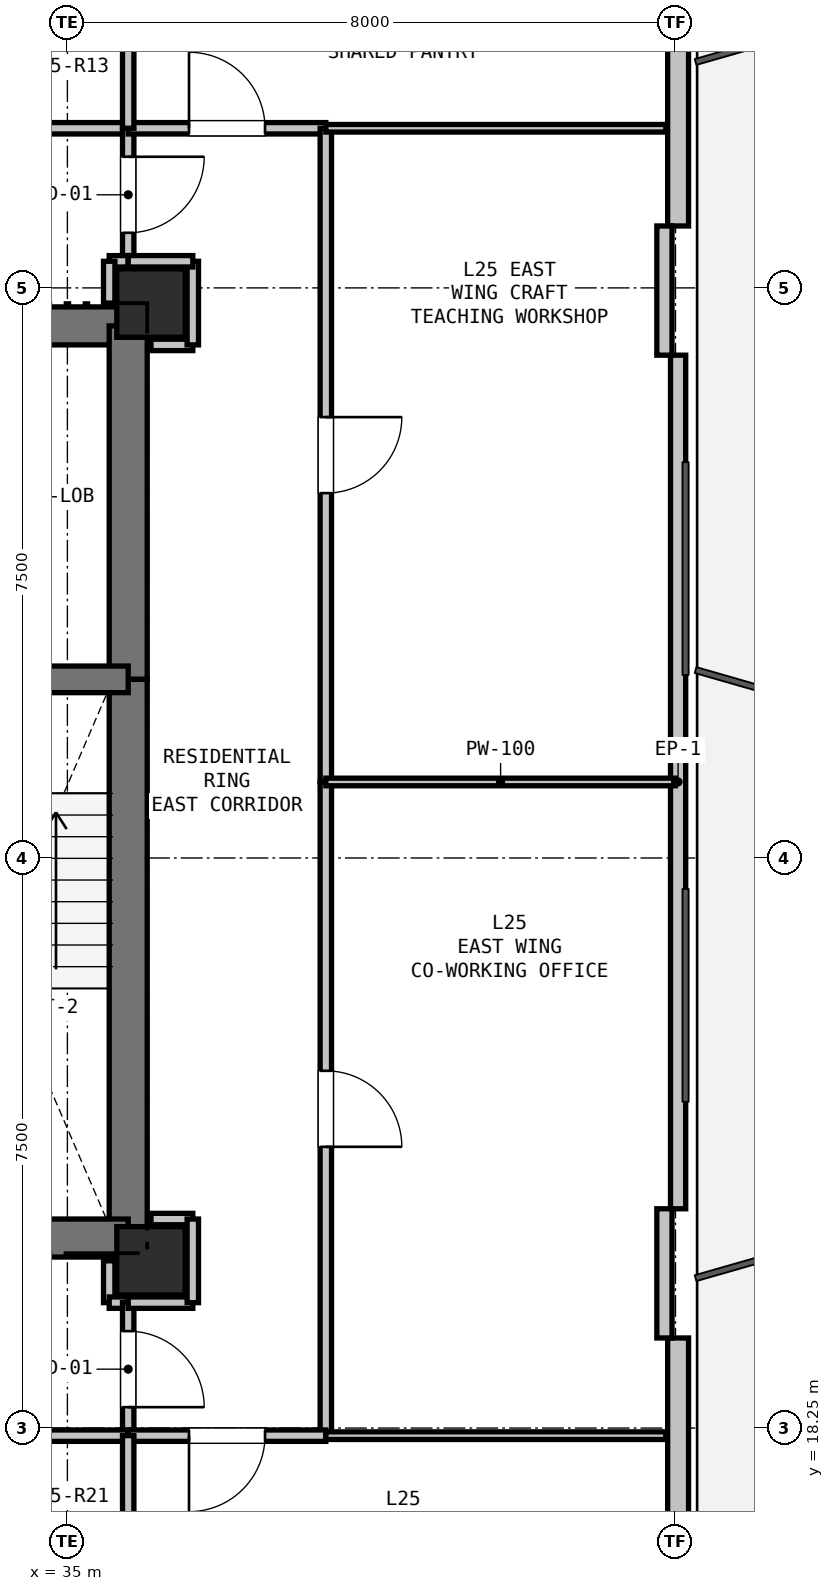
"""IFC4 building model, lengths in metres.
Left out: names, types, materials, properties, quantities, classifications, styles, units other than length and angle.
Written with IfcOpenShell. Run it as: python <this file> out.ifc"""

import sys

from ifc_helpers import new_model, si_unit, direction, frame, frame_2d, origin, origin_2d, place, context, subcontext, project, spatial, rectangle, extrude, element, fill, save


model = new_model("IFC4")
c1 = context("Model", 3, precision=1e-05, world=origin(), true_north=direction((0.0, 1.0)))
c2 = subcontext(c1, "Body", "Model", "MODEL_VIEW")
j1 = project(units=[si_unit("LENGTHUNIT", "METRE"), si_unit("PLANEANGLEUNIT", "RADIAN")], contexts=[c1])
p1 = place(None, origin())
s1 = spatial("IfcSite", under=j1, at=p1, CompositionType="ELEMENT")
p2 = place(p1, origin())
s2 = spatial("IfcBuilding", under=s1, at=p2, CompositionType="ELEMENT")
p3 = place(p2, frame((0.0, 0.0, 93.3)))
s3 = spatial("IfcBuildingStorey", under=s2, at=p3, CompositionType="ELEMENT", Elevation=93.3)
for number, where, z_axis, x_axis in (
    (1, (36.1, 33.05, 0.0), (0.0, 0.0, 1.0), (1.0, 0.0, 0.0)),
    (2, (36.1, 20.45, 0.0), (0.0, 0.0, 1.0), (1.0, 0.0, 0.0)),
):
    element("IfcColumn", number, at=place(p3, frame(where, z_axis=z_axis, x_axis=x_axis)), inside=s3, PredefinedType="COLUMN", context=c2, shape_type="SweptSolid", body=[
        extrude(rectangle(XDim=0.9, YDim=0.9, at=origin_2d()), origin(), (0.0, 0.0, 1.0), 3.3),
    ])
p4 = place(p3, frame((43.035, 45.994, 0.0), z_axis=(0.0, 0.0, 1.0), x_axis=(0.0, -1.0, 0.0)))
e3 = element("IfcWall", 3, at=p4, inside=s3, PredefinedType="SOLIDWALL", context=c2, shape_type="SweptSolid", body=[
    extrude(rectangle(XDim=11.93, YDim=0.275, at=frame_2d((5.965, 0.0))), origin(), (0.0, 0.0, 1.0), 2.67),
])
p5 = place(p4, frame((2.176, 0.0, 0.0)))
e4 = element("IfcOpeningElement", 4, at=p5, cuts=e3, PredefinedType="OPENING", context=c2, shape_type="SweptSolid", body=[
    extrude(rectangle(XDim=1.0, YDim=2.1, at=frame_2d((0.5, 1.05))), frame((0.0, 0.147, 0.0), z_axis=(0.0, -1.0, 0.0), x_axis=(1.0, 0.0, 0.0)), (0.0, 0.0, 1.0), 0.295),
])
p6 = place(p3, frame((43.035, 32.365, 0.0), z_axis=(0.0, 0.0, 1.0), x_axis=(0.0, -1.0, 0.0)))
e5 = element("IfcWall", 5, at=p6, inside=s3, PredefinedType="PARAPET", context=c2, shape_type="SweptSolid", body=[
    extrude(rectangle(XDim=11.229, YDim=0.2, at=frame_2d((5.615, 0.0))), origin(), (0.0, 0.0, 1.0), 0.2),
])
p7 = place(p3, frame((43.035, 19.435, 0.0), z_axis=(0.0, 0.0, 1.0), x_axis=(0.0, -1.0, 0.0)))
e6 = element("IfcWall", 6, at=p7, inside=s3, PredefinedType="SOLIDWALL", context=c2, shape_type="SweptSolid", body=[
    extrude(rectangle(XDim=11.93, YDim=0.275, at=frame_2d((5.965, 0.0))), origin(), (0.0, 0.0, 1.0), 2.67),
])
p8 = place(p7, frame((7.119, 0.0, 0.9)))
e7 = element("IfcOpeningElement", 7, at=p8, cuts=e6, PredefinedType="OPENING", context=c2, shape_type="SweptSolid", body=[
    extrude(rectangle(XDim=1.2, YDim=1.4, at=frame_2d((0.6, 0.7))), frame((0.0, 0.147, 0.0), z_axis=(0.0, -1.0, 0.0), x_axis=(1.0, 0.0, 0.0)), (0.0, 0.0, 1.0), 0.295),
])
for number, where, z_axis, x_axis in (
    (8, (42.854, 34.065, 0.0), (0.0, 0.0, 1.0), (0.0, -1.0, 0.0)),
    (9, (42.854, 21.135, 0.0), (0.0, 0.0, 1.0), (0.0, -1.0, 0.0)),
):
    element("IfcWall", number, at=place(p3, frame(where, z_axis=z_axis, x_axis=x_axis)), inside=s3, PredefinedType="PARAPET", context=c2, shape_type="SweptSolid", body=[
        extrude(rectangle(XDim=1.7, YDim=0.2, at=frame_2d((0.85, 0.0))), origin(), (0.0, 0.0, 1.0), 2.67),
    ])
p9 = place(p3, frame((32.35, 32.75, 0.0), z_axis=(0.0, 0.0, 1.0), x_axis=(1.0, 0.0, 0.0)))
e10 = element("IfcWall", 10, at=p9, inside=s3, PredefinedType="SHEAR", context=c2, shape_type="SweptSolid", body=[
    extrude(rectangle(XDim=3.45, YDim=0.5, at=frame_2d((1.725, 0.0))), origin(), (0.0, 0.0, 1.0), 3.05),
])
p10 = place(p9, frame((0.65, 0.0, 0.0)))
e11 = element("IfcOpeningElement", 11, at=p10, cuts=e10, PredefinedType="OPENING", context=c2, shape_type="SweptSolid", body=[
    extrude(rectangle(XDim=1.15, YDim=2.15, at=frame_2d((0.575, 1.075))), frame((0.0, 0.26, 0.0), z_axis=(0.0, -1.0, 0.0), x_axis=(1.0, 0.0, 0.0)), (0.0, 0.0, 1.0), 0.52),
])
p11 = place(p3, frame((35.8, 32.75, 0.0), z_axis=(0.0, 0.0, 1.0), x_axis=(0.0, -1.0, 0.0)))
e12 = element("IfcWall", 12, at=p11, inside=s3, PredefinedType="SHEAR", context=c2, shape_type="SweptSolid", body=[
    extrude(rectangle(XDim=4.65, YDim=0.5, at=frame_2d((2.325, 0.0))), origin(), (0.0, 0.0, 1.0), 3.05),
])
p12 = place(p3, frame((35.8, 28.1, 0.0), z_axis=(0.0, 0.0, 1.0), x_axis=(0.0, -1.0, 0.0)))
e13 = element("IfcWall", 13, at=p12, inside=s3, PredefinedType="SHEAR", context=c2, shape_type="SweptSolid", body=[
    extrude(rectangle(XDim=7.35, YDim=0.5, at=frame_2d((3.675, 0.0))), origin(), (0.0, 0.0, 1.0), 3.05),
])
p13 = place(p3, frame((35.8, 20.75, 0.0), z_axis=(0.0, 0.0, 1.0), x_axis=(-1.0, 0.0, 0.0)))
e14 = element("IfcWall", 14, at=p13, inside=s3, PredefinedType="SHEAR", context=c2, shape_type="SweptSolid", body=[
    extrude(rectangle(XDim=3.45, YDim=0.5, at=frame_2d((1.725, 0.0))), origin(), (0.0, 0.0, 1.0), 3.05),
])
p14 = place(p3, frame((32.35, 28.1, 0.0), z_axis=(0.0, 0.0, 1.0), x_axis=(1.0, 0.0, 0.0)))
e15 = element("IfcWall", 15, at=p14, inside=s3, PredefinedType="SHEAR", context=c2, shape_type="SweptSolid", body=[
    extrude(rectangle(XDim=3.45, YDim=0.35, at=frame_2d((1.725, 0.0))), origin(), (0.0, 0.0, 1.0), 3.05),
])
p15 = place(p14, frame((1.15, 0.0, 0.0)))
e16 = element("IfcOpeningElement", 16, at=p15, cuts=e15, PredefinedType="OPENING", context=c2, shape_type="SweptSolid", body=[
    extrude(rectangle(XDim=1.15, YDim=2.15, at=frame_2d((0.575, 1.075))), frame((0.0, 0.185, 0.0), z_axis=(0.0, -1.0, 0.0), x_axis=(1.0, 0.0, 0.0)), (0.0, 0.0, 1.0), 0.37),
])
p16 = place(p3, frame((35.55, 20.45, 0.0), z_axis=(0.0, 0.0, 1.0), x_axis=(0.0, -1.0, 0.0)))
e17 = element("IfcWall", 17, at=p16, inside=s3, PredefinedType="PARTITIONING", context=c2, shape_type="SweptSolid", body=[
    extrude(rectangle(XDim=0.55, YDim=0.15, at=frame_2d((0.275, 0.0))), origin(), (0.0, 0.0, 1.0), 2.498),
])
p17 = place(p3, frame((35.55, 19.9, 0.0), z_axis=(0.0, 0.0, 1.0), x_axis=(1.0, 0.0, 0.0)))
e18 = element("IfcWall", 18, at=p17, inside=s3, PredefinedType="PARTITIONING", context=c2, shape_type="SweptSolid", body=[
    extrude(rectangle(XDim=0.25, YDim=0.15, at=frame_2d((0.125, 0.0))), origin(), (0.0, 0.0, 1.0), 3.05),
])
p18 = place(p3, frame((35.8, 19.9, 0.0), z_axis=(0.0, 0.0, 1.0), x_axis=(0.0, -1.0, 0.0)))
e19 = element("IfcWall", 19, at=p18, inside=s3, PredefinedType="PARTITIONING", context=c2, shape_type="SweptSolid", body=[
    extrude(rectangle(XDim=1.75, YDim=0.15, at=frame_2d((0.875, 0.0))), origin(), (0.0, 0.0, 1.0), 3.05),
])
p19 = place(p18, frame((0.375, 0.0, 0.0)))
e20 = element("IfcOpeningElement", 20, at=p19, cuts=e19, PredefinedType="OPENING", context=c2, shape_type="SweptSolid", body=[
    extrude(rectangle(XDim=1.0, YDim=2.15, at=frame_2d((0.5, 1.075))), frame((0.0, 0.085, 0.0), z_axis=(0.0, -1.0, 0.0), x_axis=(1.0, 0.0, 0.0)), (0.0, 0.0, 1.0), 0.17),
])
for number, where, z_axis, x_axis in (
    (21, (35.8, 18.15, 0.0), (0.0, 0.0, 1.0), (-1.0, 0.0, 0.0)),
    (22, (32.2, 35.35, 0.0), (0.0, 0.0, 1.0), (1.0, 0.0, 0.0)),
):
    element("IfcWall", number, at=place(p3, frame(where, z_axis=z_axis, x_axis=x_axis)), inside=s3, PredefinedType="PARTITIONING", context=c2, shape_type="SweptSolid", body=[
        extrude(rectangle(XDim=3.6, YDim=0.15, at=frame_2d((1.8, 0.0))), origin(), (0.0, 0.0, 1.0), 3.05),
    ])
p20 = place(p3, frame((35.8, 35.35, 0.0), z_axis=(0.0, 0.0, 1.0), x_axis=(0.0, -1.0, 0.0)))
e23 = element("IfcWall", 23, at=p20, inside=s3, PredefinedType="PARTITIONING", context=c2, shape_type="SweptSolid", body=[
    extrude(rectangle(XDim=1.75, YDim=0.15, at=frame_2d((0.875, 0.0))), origin(), (0.0, 0.0, 1.0), 3.05),
])
p21 = place(p20, frame((0.375, 0.0, 0.0)))
e24 = element("IfcOpeningElement", 24, at=p21, cuts=e23, PredefinedType="OPENING", context=c2, shape_type="SweptSolid", body=[
    extrude(rectangle(XDim=1.0, YDim=2.15, at=frame_2d((0.5, 1.075))), frame((0.0, 0.085, 0.0), z_axis=(0.0, -1.0, 0.0), x_axis=(1.0, 0.0, 0.0)), (0.0, 0.0, 1.0), 0.17),
])
p22 = place(p3, frame((35.8, 33.6, 0.0), z_axis=(0.0, 0.0, 1.0), x_axis=(-1.0, 0.0, 0.0)))
e25 = element("IfcWall", 25, at=p22, inside=s3, PredefinedType="PARTITIONING", context=c2, shape_type="SweptSolid", body=[
    extrude(rectangle(XDim=0.25, YDim=0.15, at=frame_2d((0.125, 0.0))), origin(), (0.0, 0.0, 1.0), 3.05),
])
p23 = place(p3, frame((35.55, 33.6, 0.0), z_axis=(0.0, 0.0, 1.0), x_axis=(0.0, -1.0, 0.0)))
e26 = element("IfcWall", 26, at=p23, inside=s3, PredefinedType="PARTITIONING", context=c2, shape_type="SweptSolid", body=[
    extrude(rectangle(XDim=0.55, YDim=0.15, at=frame_2d((0.275, 0.0))), origin(), (0.0, 0.0, 1.0), 2.498),
])
for number, where, z_axis, x_axis in (
    (27, (36.65, 21.0, 0.0), (0.0, 0.0, 1.0), (-1.0, 0.0, 0.0)),
    (28, (36.1, 32.5, 0.0), (0.0, 0.0, 1.0), (1.0, 0.0, 0.0)),
):
    element("IfcWall", number, at=place(p3, frame(where, z_axis=z_axis, x_axis=x_axis)), inside=s3, PredefinedType="PARTITIONING", context=c2, shape_type="SweptSolid", body=[
        extrude(rectangle(XDim=0.55, YDim=0.15, at=frame_2d((0.275, 0.0))), origin(), (0.0, 0.0, 1.0), 2.498),
    ])
p24 = place(p3, frame((36.65, 32.5, 0.0), z_axis=(0.0, 0.0, 1.0), x_axis=(0.0, 1.0, 0.0)))
e29 = element("IfcWall", 29, at=p24, inside=s3, PredefinedType="PARTITIONING", context=c2, shape_type="SweptSolid", body=[
    extrude(rectangle(XDim=1.1, YDim=0.15, at=frame_2d((0.55, 0.0))), origin(), (0.0, 0.0, 1.0), 2.423),
])
p25 = place(p3, frame((36.65, 33.6, 0.0), z_axis=(0.0, 0.0, 1.0), x_axis=(-1.0, 0.0, 0.0)))
e30 = element("IfcWall", 30, at=p25, inside=s3, PredefinedType="PARTITIONING", context=c2, shape_type="SweptSolid", body=[
    extrude(rectangle(XDim=0.85, YDim=0.15, at=frame_2d((0.425, 0.0))), origin(), (0.0, 0.0, 1.0), 2.423),
])
p26 = place(p3, frame((35.8, 35.35, 0.0), z_axis=(0.0, 0.0, 1.0), x_axis=(1.0, 0.0, 0.0)))
e31 = element("IfcWall", 31, at=p26, inside=s3, PredefinedType="PARTITIONING", context=c2, shape_type="SweptSolid", body=[
    extrude(rectangle(XDim=2.6, YDim=0.15, at=frame_2d((1.3, 0.0))), origin(), (0.0, 0.0, 1.0), 2.423),
])
p27 = place(p26, frame((0.8, 0.0, 0.0)))
e32 = element("IfcOpeningElement", 32, at=p27, cuts=e31, PredefinedType="OPENING", context=c2, shape_type="SweptSolid", body=[
    extrude(rectangle(XDim=1.0, YDim=2.15, at=frame_2d((0.5, 1.075))), frame((0.0, 0.085, 0.0), z_axis=(0.0, -1.0, 0.0), x_axis=(1.0, 0.0, 0.0)), (0.0, 0.0, 1.0), 0.17),
])
p28 = place(p3, frame((38.4, 35.35, 0.0), z_axis=(0.0, 0.0, 1.0), x_axis=(0.0, -1.0, 0.0)))
e33 = element("IfcWall", 33, at=p28, inside=s3, PredefinedType="PARTITIONING", context=c2, shape_type="SweptSolid", body=[
    extrude(rectangle(XDim=8.6, YDim=0.15, at=frame_2d((4.3, 0.0))), origin(), (0.0, 0.0, 1.0), 3.05),
])
p29 = place(p28, frame((3.8, 0.0, 0.0)))
e34 = element("IfcOpeningElement", 34, at=p29, cuts=e33, PredefinedType="OPENING", context=c2, shape_type="SweptSolid", body=[
    extrude(rectangle(XDim=1.0, YDim=2.15, at=frame_2d((0.5, 1.075))), frame((0.0, 0.085, 0.0), z_axis=(0.0, -1.0, 0.0), x_axis=(1.0, 0.0, 0.0)), (0.0, 0.0, 1.0), 0.17),
])
p30 = place(p3, frame((38.4, 26.75, 0.0), z_axis=(0.0, 0.0, 1.0), x_axis=(0.0, -1.0, 0.0)))
e35 = element("IfcWall", 35, at=p30, inside=s3, PredefinedType="PARTITIONING", context=c2, shape_type="SweptSolid", body=[
    extrude(rectangle(XDim=8.6, YDim=0.15, at=frame_2d((4.3, 0.0))), origin(), (0.0, 0.0, 1.0), 3.05),
])
p31 = place(p30, frame((3.8, 0.0, 0.0)))
e36 = element("IfcOpeningElement", 36, at=p31, cuts=e35, PredefinedType="OPENING", context=c2, shape_type="SweptSolid", body=[
    extrude(rectangle(XDim=1.0, YDim=2.15, at=frame_2d((0.5, 1.075))), frame((0.0, 0.085, 0.0), z_axis=(0.0, -1.0, 0.0), x_axis=(1.0, 0.0, 0.0)), (0.0, 0.0, 1.0), 0.17),
])
p32 = place(p3, frame((38.4, 18.15, 0.0), z_axis=(0.0, 0.0, 1.0), x_axis=(-1.0, 0.0, 0.0)))
e37 = element("IfcWall", 37, at=p32, inside=s3, PredefinedType="PARTITIONING", context=c2, shape_type="SweptSolid", body=[
    extrude(rectangle(XDim=2.6, YDim=0.15, at=frame_2d((1.3, 0.0))), origin(), (0.0, 0.0, 1.0), 2.423),
])
p33 = place(p32, frame((0.8, 0.0, 0.0)))
e38 = element("IfcOpeningElement", 38, at=p33, cuts=e37, PredefinedType="OPENING", context=c2, shape_type="SweptSolid", body=[
    extrude(rectangle(XDim=1.0, YDim=2.15, at=frame_2d((0.5, 1.075))), frame((0.0, 0.085, 0.0), z_axis=(0.0, -1.0, 0.0), x_axis=(1.0, 0.0, 0.0)), (0.0, 0.0, 1.0), 0.17),
])
p34 = place(p3, frame((35.8, 19.9, 0.0), z_axis=(0.0, 0.0, 1.0), x_axis=(1.0, 0.0, 0.0)))
e39 = element("IfcWall", 39, at=p34, inside=s3, PredefinedType="PARTITIONING", context=c2, shape_type="SweptSolid", body=[
    extrude(rectangle(XDim=0.85, YDim=0.15, at=frame_2d((0.425, 0.0))), origin(), (0.0, 0.0, 1.0), 2.423),
])
p35 = place(p3, frame((36.65, 19.9, 0.0), z_axis=(0.0, 0.0, 1.0), x_axis=(0.0, 1.0, 0.0)))
e40 = element("IfcWall", 40, at=p35, inside=s3, PredefinedType="PARTITIONING", context=c2, shape_type="SweptSolid", body=[
    extrude(rectangle(XDim=1.1, YDim=0.15, at=frame_2d((0.55, 0.0))), origin(), (0.0, 0.0, 1.0), 3.05),
])
for number, where, z_axis, x_axis in (
    (41, (35.8, 37.65, 0.0), (0.0, 0.0, 1.0), (0.0, -1.0, 0.0)),
    (42, (35.8, 18.15, 0.0), (0.0, 0.0, 1.0), (0.0, -1.0, 0.0)),
):
    element("IfcWall", number, at=place(p3, frame(where, z_axis=z_axis, x_axis=x_axis)), inside=s3, PredefinedType="PARTITIONING", context=c2, shape_type="SweptSolid", body=[
        extrude(rectangle(XDim=2.3, YDim=0.15, at=frame_2d((1.15, 0.0))), origin(), (0.0, 0.0, 1.0), 3.05),
    ])
for number, where, z_axis, x_axis in (
    (43, (42.873, 35.35, 0.0), (0.0, 0.0, 1.0), (-1.0, 0.0, 0.0)),
    (44, (38.4, 18.15, 0.0), (0.0, 0.0, 1.0), (1.0, 0.0, 0.0)),
):
    element("IfcWall", number, at=place(p3, frame(where, z_axis=z_axis, x_axis=x_axis)), inside=s3, PredefinedType="PARTITIONING", context=c2, shape_type="SweptSolid", body=[
        extrude(rectangle(XDim=4.473, YDim=0.1, at=frame_2d((2.237, 0.0))), origin(), (0.0, 0.0, 1.0), 2.365),
    ])
p36 = place(p3, frame((42.999, 26.75, 0.0), z_axis=(0.0, 0.0, 1.0), x_axis=(-1.0, 0.0, 0.0)))
e45 = element("IfcWall", 45, at=p36, inside=s3, PredefinedType="PARTITIONING", context=c2, shape_type="SweptSolid", body=[
    extrude(rectangle(XDim=4.599, YDim=0.1, at=frame_2d((2.299, 0.0))), origin(), (0.0, 0.0, 1.0), 2.365),
])
p37 = place(p19, origin())
e46 = element("IfcDoor", 46, at=p37, inside=s3, OperationType="SINGLE_SWING_RIGHT", PredefinedType="DOOR", context=c2, shape_type="SweptSolid", body=[
    extrude(rectangle(XDim=1.0, YDim=2.15, at=frame_2d((0.5, 1.075))), frame((0.0, 0.025, 0.0), z_axis=(0.0, -1.0, 0.0), x_axis=(1.0, 0.0, 0.0)), (0.0, 0.0, 1.0), 0.05),
])
fill(e20, e46)
p38 = place(p21, origin())
e47 = element("IfcDoor", 47, at=p38, inside=s3, OperationType="SINGLE_SWING_LEFT", PredefinedType="DOOR", context=c2, shape_type="SweptSolid", body=[
    extrude(rectangle(XDim=1.0, YDim=2.15, at=frame_2d((0.5, 1.075))), frame((0.0, 0.025, 0.0), z_axis=(0.0, -1.0, 0.0), x_axis=(1.0, 0.0, 0.0)), (0.0, 0.0, 1.0), 0.05),
])
fill(e24, e47)
p39 = place(p27, origin())
e48 = element("IfcDoor", 48, at=p39, inside=s3, OperationType="SINGLE_SWING_LEFT", PredefinedType="DOOR", context=c2, shape_type="SweptSolid", body=[
    extrude(rectangle(XDim=1.0, YDim=2.15, at=frame_2d((0.5, 1.075))), frame((0.0, 0.025, 0.0), z_axis=(0.0, -1.0, 0.0), x_axis=(1.0, 0.0, 0.0)), (0.0, 0.0, 1.0), 0.05),
])
fill(e32, e48)
p40 = place(p33, origin())
e49 = element("IfcDoor", 49, at=p40, inside=s3, OperationType="SINGLE_SWING_RIGHT", PredefinedType="DOOR", context=c2, shape_type="SweptSolid", body=[
    extrude(rectangle(XDim=1.0, YDim=2.15, at=frame_2d((0.5, 1.075))), frame((0.0, 0.025, 0.0), z_axis=(0.0, -1.0, 0.0), x_axis=(1.0, 0.0, 0.0)), (0.0, 0.0, 1.0), 0.05),
])
fill(e38, e49)
p41 = place(p29, origin())
e50 = element("IfcDoor", 50, at=p41, inside=s3, OperationType="SINGLE_SWING_LEFT", PredefinedType="DOOR", context=c2, shape_type="SweptSolid", body=[
    extrude(rectangle(XDim=1.0, YDim=2.15, at=frame_2d((0.5, 1.075))), frame((0.0, 0.025, 0.0), z_axis=(0.0, -1.0, 0.0), x_axis=(1.0, 0.0, 0.0)), (0.0, 0.0, 1.0), 0.05),
])
fill(e34, e50)
p42 = place(p31, origin())
e51 = element("IfcDoor", 51, at=p42, inside=s3, OperationType="SINGLE_SWING_RIGHT", PredefinedType="DOOR", context=c2, shape_type="SweptSolid", body=[
    extrude(rectangle(XDim=1.0, YDim=2.15, at=frame_2d((0.5, 1.075))), frame((0.0, 0.025, 0.0), z_axis=(0.0, -1.0, 0.0), x_axis=(1.0, 0.0, 0.0)), (0.0, 0.0, 1.0), 0.05),
])
fill(e36, e51)
save(model, sys.argv[1])
